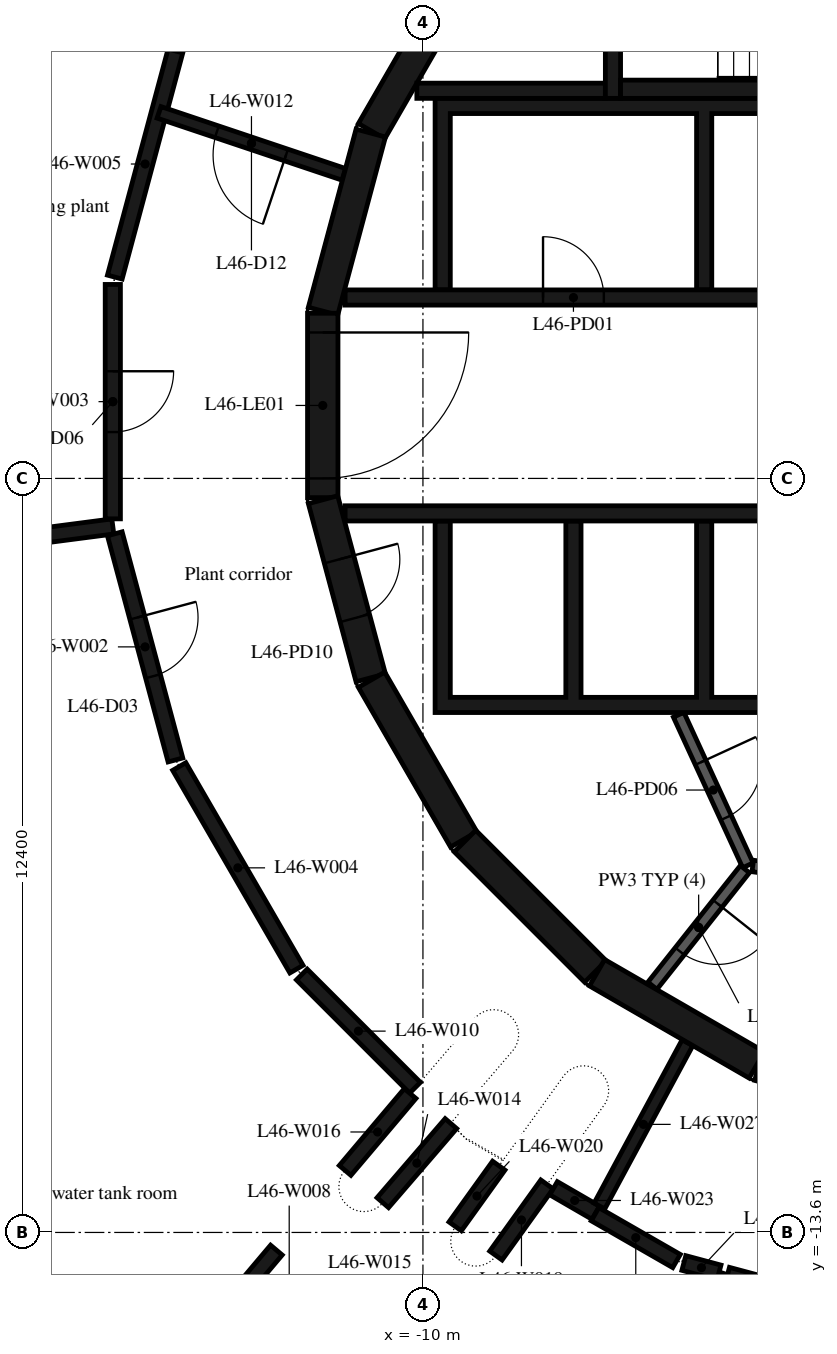
"""IFC4 building model, lengths in metres.
Left out: names, types, materials, properties, quantities, classifications, styles, units other than length and angle.
Written with IfcOpenShell. Run it as: python <this file> out.ifc"""

import sys

from ifc_helpers import new_model, si_unit, direction, frame, frame_2d, origin, place, context, subcontext, project, spatial, polyline, rectangle, outline, extrude, element, fill, save


model = new_model("IFC4")
c1 = context("Model", 3, precision=1e-05, world=origin(), true_north=direction((0.0, 1.0)))
c2 = subcontext(c1, "Body", "Model", "MODEL_VIEW")
j1 = project(units=[si_unit("LENGTHUNIT", "METRE"), si_unit("PLANEANGLEUNIT", "RADIAN")], contexts=[c1])
p1 = place(None, origin())
s1 = spatial("IfcSite", under=j1, at=p1, CompositionType="ELEMENT")
p2 = place(p1, origin())
s2 = spatial("IfcBuilding", under=s1, at=p2, CompositionType="ELEMENT")
p3 = place(p2, frame((0.0, 0.0, 183.2)))
s3 = spatial("IfcBuildingStorey", under=s2, at=p3, CompositionType="ELEMENT", Elevation=183.2)
for number, where, z_axis, x_axis in (
    (1, (-9.329, 7.137, 0.0), (0.0, 0.0, 1.0), (-0.5, -0.866, 0.0)),
    (2, (-10.858, 4.479, 0.0), (0.0, 0.0, 1.0), (-0.259, -0.966, 0.0)),
):
    element("IfcWall", number, at=place(p3, frame(where, z_axis=z_axis, x_axis=x_axis)), inside=s3, PredefinedType="SHEAR", context=c2, shape_type="SweptSolid", body=[
        extrude(rectangle(XDim=3.033, YDim=0.5, at=frame_2d((1.516, 0.0))), origin(), (0.0, 0.0, 1.0), 4.75),
    ])
p4 = place(p3, frame((-11.647, 1.516, 0.0), z_axis=(0.0, 0.0, 1.0), x_axis=(0.0, -1.0, 0.0)))
e3 = element("IfcWall", 3, at=p4, inside=s3, PredefinedType="SHEAR", context=c2, shape_type="SweptSolid", body=[
    extrude(rectangle(XDim=3.033, YDim=0.5, at=frame_2d((1.516, 0.0))), origin(), (0.0, 0.0, 1.0), 4.75),
])
p5 = place(p4, frame((0.316, 0.0, 0.0)))
e4 = element("IfcOpeningElement", 4, at=p5, cuts=e3, PredefinedType="OPENING", context=c2, shape_type="SweptSolid", body=[
    extrude(rectangle(XDim=2.4, YDim=2.1, at=frame_2d((1.2, 1.05))), frame((0.0, 0.26, 0.0), z_axis=(0.0, -1.0, 0.0), x_axis=(1.0, 0.0, 0.0)), (0.0, 0.0, 1.0), 0.52),
])
p6 = place(p3, frame((-11.643, -1.55, 0.0), z_axis=(0.0, 0.0, 1.0), x_axis=(0.258734743916, -0.965948410781, 0.0)))
e5 = element("IfcWall", 5, at=p6, inside=s3, PredefinedType="SHEAR", context=c2, shape_type="SweptSolid", body=[
    extrude(rectangle(XDim=3.033, YDim=0.5, at=frame_2d((1.516, 0.0))), origin(), (0.0, 0.0, 1.0), 4.75),
])
p7 = place(p6, frame((1.016, 0.0, 0.0)))
e6 = element("IfcOpeningElement", 6, at=p7, cuts=e5, PredefinedType="OPENING", context=c2, shape_type="SweptSolid", body=[
    extrude(rectangle(XDim=1.0, YDim=2.4, at=frame_2d((0.5, 1.2))), frame((0.0, 0.26, 0.0), z_axis=(0.0, -1.0, 0.0), x_axis=(1.0, 0.0, 0.0)), (0.0, 0.0, 1.0), 0.52),
])
p8 = place(p3, frame((-10.845, -4.51, 0.0), z_axis=(0.0, 0.0, 1.0), x_axis=(0.500087131594, -0.865975092491, 0.0)))
e7 = element("IfcWall", 7, at=p8, inside=s3, PredefinedType="SHEAR", context=c2, shape_type="SweptSolid", body=[
    extrude(rectangle(XDim=3.033, YDim=0.5, at=frame_2d((1.516, 0.0))), origin(), (0.0, 0.0, 1.0), 4.75),
])
p9 = place(p3, frame((-9.308, -7.164, 0.0), z_axis=(0.0, 0.0, 1.0), x_axis=(0.707106781187, -0.707106781187, 0.0)))
e8 = element("IfcWall", 8, at=p9, inside=s3, PredefinedType="SHEAR", context=c2, shape_type="SweptSolid", body=[
    extrude(rectangle(XDim=3.032, YDim=0.5, at=frame_2d((1.516, 0.0))), origin(), (0.0, 0.0, 1.0), 4.75),
])
for number, where, z_axis, x_axis in (
    (9, (-7.137, -9.329, 0.0), (0.0, 0.0, 1.0), (0.866, -0.5, 0.0)),
    (10, (-4.479, -10.858, 0.0), (0.0, 0.0, 1.0), (0.966, -0.259, 0.0)),
):
    element("IfcWall", number, at=place(p3, frame(where, z_axis=z_axis, x_axis=x_axis)), inside=s3, PredefinedType="SHEAR", context=c2, shape_type="SweptSolid", body=[
        extrude(rectangle(XDim=3.033, YDim=0.5, at=frame_2d((1.516, 0.0))), origin(), (0.0, 0.0, 1.0), 4.75),
    ])
p10 = place(p3, frame((-6.75, 5.2, 0.0), z_axis=(0.0, 0.0, 1.0), x_axis=(1.0, 0.0, 0.0)))
e11 = element("IfcWall", 11, at=p10, inside=s3, PredefinedType="SHEAR", context=c2, shape_type="SweptSolid", body=[
    extrude(rectangle(XDim=6.75, YDim=0.3, at=frame_2d((3.375, 0.0))), origin(), (0.0, 0.0, 1.0), 4.75),
])
p11 = place(p3, frame((-6.875, 8.97, 0.0), z_axis=(0.0, 0.0, 1.0), x_axis=(0.0, -1.0, 0.0)))
e12 = element("IfcWall", 12, at=p11, inside=s3, PredefinedType="SHEAR", context=c2, shape_type="SweptSolid", body=[
    extrude(rectangle(XDim=3.92, YDim=0.25, at=frame_2d((1.96, 0.0))), origin(), (0.0, 0.0, 1.0), 4.75),
])
p12 = place(p11, frame((1.61, 0.0, 0.0)))
e13 = element("IfcOpeningElement", 13, at=p12, cuts=e12, PredefinedType="OPENING", context=c2, shape_type="SweptSolid", body=[
    extrude(rectangle(XDim=1.2, YDim=2.1, at=frame_2d((0.6, 1.05))), frame((0.0, 0.135, 0.0), z_axis=(0.0, -1.0, 0.0), x_axis=(1.0, 0.0, 0.0)), (0.0, 0.0, 1.0), 0.27),
])
p13 = place(p3, frame((-7.0, 5.175, 0.0), z_axis=(0.0, 0.0, 1.0), x_axis=(-1.0, 0.0, 0.0)))
e14 = element("IfcWall", 14, at=p13, inside=s3, PredefinedType="SHEAR", context=c2, shape_type="SweptSolid", body=[
    extrude(rectangle(XDim=3.1, YDim=0.25, at=frame_2d((1.55, 0.0))), origin(), (0.0, 0.0, 1.0), 4.75),
])
p14 = place(p3, origin())
e15 = element("IfcWall", 15, at=p14, inside=s3, PredefinedType="SHEAR", context=c2, shape_type="SweptSolid", body=[
    extrude(outline(polyline([(-9.55, 4.8), (-5.5, 4.8), (-5.5, 1.9), (-5.25, 1.9), (-5.25, 4.8), (-1.2, 4.8), (-1.2, 1.9), (-0.95, 1.9), (-0.95, 4.8), (0.95, 4.8), (0.95, 1.9), (1.2, 1.9), (1.2, 4.8), (3.1, 4.8), (3.1, 1.9), (3.35, 1.9), (3.35, 4.8), (5.25, 4.8), (5.25, 1.9), (5.5, 1.9), (5.5, 4.8), (7.4, 4.8), (7.4, 1.9), (7.65, 1.9), (7.65, 4.8), (9.55, 4.8), (9.55, 1.9), (9.8, 1.9), (9.8, 4.8), (9.8, 5.05), (-9.8, 5.05), (-9.8, 4.8), (-9.8, 1.9), (-9.55, 1.9), (-9.55, 4.8)])), origin(), (0.0, 0.0, 1.0), 4.75),
])
p15 = place(p3, origin())
e16 = element("IfcWall", 16, at=p15, inside=s3, PredefinedType="SHEAR", context=c2, shape_type="SweptSolid", body=[
    extrude(outline(polyline([(9.8, -5.05), (9.8, -4.8), (9.8, -1.9), (9.55, -1.9), (9.55, -4.8), (7.65, -4.8), (7.65, -1.9), (7.4, -1.9), (7.4, -4.8), (5.5, -4.8), (5.5, -1.9), (5.25, -1.9), (5.25, -4.8), (3.35, -4.8), (3.35, -1.9), (3.1, -1.9), (3.1, -4.8), (1.2, -4.8), (1.2, -1.9), (0.95, -1.9), (0.95, -4.8), (-0.95, -4.8), (-0.95, -1.9), (-1.2, -1.9), (-1.2, -4.8), (-5.25, -4.8), (-5.25, -1.9), (-5.5, -1.9), (-5.5, -4.8), (-7.4, -4.8), (-7.4, -1.9), (-7.65, -1.9), (-7.65, -4.8), (-9.55, -4.8), (-9.55, -1.9), (-9.8, -1.9), (-9.8, -4.8), (-9.8, -5.05), (9.8, -5.05)])), origin(), (0.0, 0.0, 1.0), 4.75),
])
p16 = place(p3, frame((-11.28, 1.775, 0.0), z_axis=(0.0, 0.0, 1.0), x_axis=(1.0, 0.0, 0.0)))
e17 = element("IfcWall", 17, at=p16, inside=s3, PredefinedType="SHEAR", context=c2, shape_type="SweptSolid", body=[
    extrude(rectangle(XDim=14.38, YDim=0.25, at=frame_2d((7.19, 0.0))), origin(), (0.0, 0.0, 1.0), 4.75),
])
p17 = place(p16, frame((10.73, 0.0, 0.0)))
e18 = element("IfcOpeningElement", 18, at=p17, cuts=e17, PredefinedType="OPENING", context=c2, shape_type="SweptSolid", body=[
    extrude(rectangle(XDim=1.1, YDim=2.1, at=frame_2d((0.55, 1.05))), frame((0.0, 0.135, 0.0), z_axis=(0.0, -1.0, 0.0), x_axis=(1.0, 0.0, 0.0)), (0.0, 0.0, 1.0), 0.27),
])
p18 = place(p16, frame((12.88, 0.0, 0.0)))
e19 = element("IfcOpeningElement", 19, at=p18, cuts=e17, PredefinedType="OPENING", context=c2, shape_type="SweptSolid", body=[
    extrude(rectangle(XDim=1.1, YDim=2.1, at=frame_2d((0.55, 1.05))), frame((0.0, 0.135, 0.0), z_axis=(0.0, -1.0, 0.0), x_axis=(1.0, 0.0, 0.0)), (0.0, 0.0, 1.0), 0.27),
])
p19 = place(p16, frame((3.255, 0.0, 0.0)))
e20 = element("IfcOpeningElement", 20, at=p19, cuts=e17, PredefinedType="OPENING", context=c2, shape_type="SweptSolid", body=[
    extrude(rectangle(XDim=1.0, YDim=2.4, at=frame_2d((0.5, 1.2))), frame((0.0, 0.135, 0.0), z_axis=(0.0, -1.0, 0.0), x_axis=(1.0, 0.0, 0.0)), (0.0, 0.0, 1.0), 0.27),
])
p20 = place(p16, frame((7.555, 0.0, 0.0)))
e21 = element("IfcOpeningElement", 21, at=p20, cuts=e17, PredefinedType="OPENING", context=c2, shape_type="SweptSolid", body=[
    extrude(rectangle(XDim=1.0, YDim=2.4, at=frame_2d((0.5, 1.2))), frame((0.0, 0.135, 0.0), z_axis=(0.0, -1.0, 0.0), x_axis=(1.0, 0.0, 0.0)), (0.0, 0.0, 1.0), 0.27),
])
p21 = place(p3, frame((-11.28, -1.775, 0.0), z_axis=(0.0, 0.0, 1.0), x_axis=(1.0, 0.0, 0.0)))
e22 = element("IfcWall", 22, at=p21, inside=s3, PredefinedType="SHEAR", context=c2, shape_type="SweptSolid", body=[
    extrude(rectangle(XDim=14.38, YDim=0.25, at=frame_2d((7.19, 0.0))), origin(), (0.0, 0.0, 1.0), 4.75),
])
p22 = place(p21, frame((12.88, 0.0, 0.0)))
e23 = element("IfcOpeningElement", 23, at=p22, cuts=e22, PredefinedType="OPENING", context=c2, shape_type="SweptSolid", body=[
    extrude(rectangle(XDim=1.1, YDim=2.1, at=frame_2d((0.55, 1.05))), frame((0.0, 0.135, 0.0), z_axis=(0.0, -1.0, 0.0), x_axis=(1.0, 0.0, 0.0)), (0.0, 0.0, 1.0), 0.27),
])
p23 = place(p21, frame((7.555, 0.0, 0.0)))
e24 = element("IfcOpeningElement", 24, at=p23, cuts=e22, PredefinedType="OPENING", context=c2, shape_type="SweptSolid", body=[
    extrude(rectangle(XDim=1.0, YDim=2.4, at=frame_2d((0.5, 1.2))), frame((0.0, 0.135, 0.0), z_axis=(0.0, -1.0, 0.0), x_axis=(1.0, 0.0, 0.0)), (0.0, 0.0, 1.0), 0.27),
])
p24 = place(p21, frame((10.78, 0.0, 0.0)))
e25 = element("IfcOpeningElement", 25, at=p24, cuts=e22, PredefinedType="OPENING", context=c2, shape_type="SweptSolid", body=[
    extrude(rectangle(XDim=1.0, YDim=2.4, at=frame_2d((0.5, 1.2))), frame((0.0, 0.135, 0.0), z_axis=(0.0, -1.0, 0.0), x_axis=(1.0, 0.0, 0.0)), (0.0, 0.0, 1.0), 0.27),
])
p25 = place(p3, frame((-5.795, -5.086, 0.0), z_axis=(0.0, 0.0, 1.0), x_axis=(0.417887867606, -0.908498613157, 0.0)))
e26 = element("IfcWall", 26, at=p25, inside=s3, PredefinedType="PARTITIONING", context=c2, shape_type="SweptSolid", body=[
    extrude(rectangle(XDim=2.726, YDim=0.19, at=frame_2d((1.363, 0.0))), origin(), (0.0, 0.0, 1.0), 4.75),
])
p26 = place(p25, frame((0.863, 0.0, 0.0)))
e27 = element("IfcOpeningElement", 27, at=p26, cuts=e26, PredefinedType="OPENING", context=c2, shape_type="SweptSolid", body=[
    extrude(rectangle(XDim=1.0, YDim=2.4, at=frame_2d((0.5, 1.2))), frame((0.0, 0.105, 0.0), z_axis=(0.0, -1.0, 0.0), x_axis=(1.0, 0.0, 0.0)), (0.0, 0.0, 1.0), 0.21),
])
p27 = place(p3, frame((-4.706, -7.625, 0.0), z_axis=(0.0, 0.0, 1.0), x_axis=(-0.621392599334, -0.783499353856, 0.0)))
e28 = element("IfcWall", 28, at=p27, inside=s3, PredefinedType="PARTITIONING", context=c2, shape_type="SweptSolid", body=[
    extrude(rectangle(XDim=2.447, YDim=0.19, at=frame_2d((1.224, 0.0))), origin(), (0.0, 0.0, 1.0), 4.75),
])
p28 = place(p27, frame((0.724, 0.0, 0.0)))
e29 = element("IfcOpeningElement", 29, at=p28, cuts=e28, PredefinedType="OPENING", context=c2, shape_type="SweptSolid", body=[
    extrude(rectangle(XDim=1.0, YDim=2.4, at=frame_2d((0.5, 1.2))), frame((0.0, 0.105, 0.0), z_axis=(0.0, -1.0, 0.0), x_axis=(1.0, 0.0, 0.0)), (0.0, 0.0, 1.0), 0.21),
])
p29 = place(p3, frame((-2.42, -7.865, 0.0), z_axis=(0.0, 0.0, 1.0), x_axis=(-0.990972299108, 0.134066783362, 0.0)))
e30 = element("IfcWall", 30, at=p29, inside=s3, PredefinedType="PARTITIONING", context=c2, shape_type="SweptSolid", body=[
    extrude(rectangle(XDim=2.176, YDim=0.19, at=frame_2d((1.088, 0.0))), origin(), (0.0, 0.0, 1.0), 4.75),
])
p30 = place(p3, frame((-15.1, -1.99, 0.0), z_axis=(0.0, 0.0, 1.0), x_axis=(-0.991616704788, -0.129214205046, 0.0)))
e31 = element("IfcWall", 31, at=p30, inside=s3, PredefinedType="PARTITIONING", context=c2, shape_type="SweptSolid", body=[
    extrude(rectangle(XDim=4.176, YDim=0.25, at=frame_2d((2.088, 0.0))), origin(), (0.0, 0.0, 1.0), 4.75),
])
p31 = place(p3, frame((-15.068, -2.111, 0.0), z_axis=(0.0, 0.0, 1.0), x_axis=(0.259059323171, -0.965861411942, 0.0)))
e32 = element("IfcWall", 32, at=p31, inside=s3, PredefinedType="PARTITIONING", context=c2, shape_type="SweptSolid", body=[
    extrude(rectangle(XDim=3.851, YDim=0.25, at=frame_2d((1.925, 0.0))), origin(), (0.0, 0.0, 1.0), 4.75),
])
p32 = place(p31, frame((1.425, 0.0, 0.0)))
e33 = element("IfcOpeningElement", 33, at=p32, cuts=e32, PredefinedType="OPENING", context=c2, shape_type="SweptSolid", body=[
    extrude(rectangle(XDim=1.0, YDim=2.1, at=frame_2d((0.5, 1.05))), frame((0.0, 0.135, 0.0), z_axis=(0.0, -1.0, 0.0), x_axis=(1.0, 0.0, 0.0)), (0.0, 0.0, 1.0), 0.27),
])
p33 = place(p3, frame((-15.1, 1.99, 0.0), z_axis=(0.0, 0.0, 1.0), x_axis=(0.0, -1.0, 0.0)))
e34 = element("IfcWall", 34, at=p33, inside=s3, PredefinedType="PARTITIONING", context=c2, shape_type="SweptSolid", body=[
    extrude(rectangle(XDim=3.855, YDim=0.25, at=frame_2d((1.927, 0.0))), origin(), (0.0, 0.0, 1.0), 4.75),
])
p34 = place(p33, frame((1.427, 0.0, 0.0)))
e35 = element("IfcOpeningElement", 35, at=p34, cuts=e34, PredefinedType="OPENING", context=c2, shape_type="SweptSolid", body=[
    extrude(rectangle(XDim=1.0, YDim=2.1, at=frame_2d((0.5, 1.05))), frame((0.0, 0.135, 0.0), z_axis=(0.0, -1.0, 0.0), x_axis=(1.0, 0.0, 0.0)), (0.0, 0.0, 1.0), 0.27),
])
p35 = place(p3, frame((-14.007, -5.938, 0.0), z_axis=(0.0, 0.0, 1.0), x_axis=(0.500708693508, -0.865615852585, 0.0)))
e36 = element("IfcWall", 36, at=p35, inside=s3, PredefinedType="PARTITIONING", context=c2, shape_type="SweptSolid", body=[
    extrude(rectangle(XDim=3.849, YDim=0.25, at=frame_2d((1.925, 0.0))), origin(), (0.0, 0.0, 1.0), 4.75),
])
p36 = place(p3, frame((-14.07, 5.83, 0.0), z_axis=(0.0, 0.0, 1.0), x_axis=(-0.259059323171, -0.965861411942, 0.0)))
e37 = element("IfcWall", 37, at=p36, inside=s3, PredefinedType="PARTITIONING", context=c2, shape_type="SweptSolid", body=[
    extrude(rectangle(XDim=3.851, YDim=0.25, at=frame_2d((1.925, 0.0))), origin(), (0.0, 0.0, 1.0), 4.75),
])
p37 = place(p3, frame((-12.41, -13.89, 0.0), z_axis=(0.0, 0.0, 1.0), x_axis=(-0.645015932436, -0.764169121925, 0.0)))
e38 = element("IfcWall", 38, at=p37, inside=s3, PredefinedType="PARTITIONING", context=c2, shape_type="SweptSolid", body=[
    extrude(rectangle(XDim=1.537, YDim=0.25, at=frame_2d((0.768, 0.0))), origin(), (0.0, 0.0, 1.0), 4.75),
])
p38 = place(p3, frame((-11.992, -9.358, 0.0), z_axis=(0.0, 0.0, 1.0), x_axis=(0.707153144284, -0.707060415049, 0.0)))
e39 = element("IfcWall", 39, at=p38, inside=s3, PredefinedType="PARTITIONING", context=c2, shape_type="SweptSolid", body=[
    extrude(rectangle(XDim=2.633, YDim=0.25, at=frame_2d((1.316, 0.0))), origin(), (0.0, 0.0, 1.0), 4.75),
])
p39 = place(p3, frame((-11.3, 3.8, 0.0), z_axis=(0.0, 0.0, 1.0), x_axis=(-0.94805712629, 0.318100118345, 0.0)))
e40 = element("IfcWall", 40, at=p39, inside=s3, PredefinedType="PARTITIONING", context=c2, shape_type="SweptSolid", body=[
    extrude(rectangle(XDim=3.207, YDim=0.2, at=frame_2d((1.603, 0.0))), origin(), (0.0, 0.0, 1.0), 4.75),
])
p40 = place(p39, frame((1.003, 0.0, 0.0)))
e41 = element("IfcOpeningElement", 41, at=p40, cuts=e40, PredefinedType="OPENING", context=c2, shape_type="SweptSolid", body=[
    extrude(rectangle(XDim=1.2, YDim=2.1, at=frame_2d((0.6, 1.05))), frame((0.0, 0.11, 0.0), z_axis=(0.0, -1.0, 0.0), x_axis=(1.0, 0.0, 0.0)), (0.0, 0.0, 1.0), 0.22),
])
p41 = place(p3, frame((-10.66, -13.11, 0.0), z_axis=(0.0, 0.0, 1.0), x_axis=(0.652652485568, 0.757657398223, 0.0)))
e42 = element("IfcWall", 42, at=p41, inside=s3, PredefinedType="PARTITIONING", context=c2, shape_type="SweptSolid", body=[
    extrude(rectangle(XDim=1.716, YDim=0.25, at=frame_2d((0.858, 0.0))), origin(), (0.0, 0.0, 1.0), 4.75),
])
p42 = place(p3, frame((-10.211, -11.315, 0.0), z_axis=(0.0, 0.0, 1.0), x_axis=(-0.645677872328, -0.763609903803, 0.0)))
e43 = element("IfcWall", 43, at=p42, inside=s3, PredefinedType="PARTITIONING", context=c2, shape_type="SweptSolid", body=[
    extrude(rectangle(XDim=1.656, YDim=0.25, at=frame_2d((0.828, 0.0))), origin(), (0.0, 0.0, 1.0), 4.75),
])
p43 = place(p3, frame((-8.8, -13.98, 0.0), z_axis=(0.0, 0.0, 1.0), x_axis=(0.583272745403, 0.812276371976, 0.0)))
e44 = element("IfcWall", 44, at=p43, inside=s3, PredefinedType="PARTITIONING", context=c2, shape_type="SweptSolid", body=[
    extrude(rectangle(XDim=1.44, YDim=0.25, at=frame_2d((0.72, 0.0))), origin(), (0.0, 0.0, 1.0), 4.75),
])
p44 = place(p3, frame((-8.753, -12.501, 0.0), z_axis=(0.0, 0.0, 1.0), x_axis=(-0.583284065891, -0.812268242933, 0.0)))
e45 = element("IfcWall", 45, at=p44, inside=s3, PredefinedType="PARTITIONING", context=c2, shape_type="SweptSolid", body=[
    extrude(rectangle(XDim=1.229, YDim=0.25, at=frame_2d((0.615, 0.0))), origin(), (0.0, 0.0, 1.0), 4.75),
])
p45 = place(p3, frame((-7.852, -12.873, 0.0), z_axis=(0.0, 0.0, 1.0), x_axis=(0.865197326025, -0.501431537739, 0.0)))
e46 = element("IfcWall", 46, at=p45, inside=s3, PredefinedType="PARTITIONING", context=c2, shape_type="SweptSolid", body=[
    extrude(rectangle(XDim=0.803, YDim=0.25, at=frame_2d((0.402, 0.0))), origin(), (0.0, 0.0, 1.0), 4.75),
])
p46 = place(p3, frame((-7.844, -22.375, 0.0), z_axis=(0.0, 0.0, 1.0), x_axis=(0.330759154165, 0.943715201709, 0.0)))
e47 = element("IfcWall", 47, at=p46, inside=s3, PredefinedType="PARTITIONING", context=c2, shape_type="SweptSolid", body=[
    extrude(rectangle(XDim=8.567, YDim=0.25, at=frame_2d((4.283, 0.0))), origin(), (0.0, 0.0, 1.0), 4.75),
])
p47 = place(p3, frame((-7.097, -13.165, 0.0), z_axis=(0.0, 0.0, 1.0), x_axis=(0.474500660471, 0.880255146655, 0.0)))
e48 = element("IfcWall", 48, at=p47, inside=s3, PredefinedType="PARTITIONING", context=c2, shape_type="SweptSolid", body=[
    extrude(rectangle(XDim=3.051, YDim=0.2, at=frame_2d((1.525, 0.0))), origin(), (0.0, 0.0, 1.0), 4.75),
])
p48 = place(p3, frame((-5.83, -14.07, 0.0), z_axis=(0.0, 0.0, 1.0), x_axis=(-0.867015512993, 0.498281145769, 0.0)))
e49 = element("IfcWall", 49, at=p48, inside=s3, PredefinedType="PARTITIONING", context=c2, shape_type="SweptSolid", body=[
    extrude(rectangle(XDim=1.545, YDim=0.25, at=frame_2d((0.773, 0.0))), origin(), (0.0, 0.0, 1.0), 4.75),
])
p49 = place(p3, frame((-5.131, -14.258, 0.0), z_axis=(0.0, 0.0, 1.0), x_axis=(-0.965827909732, 0.259184198561, 0.0)))
e50 = element("IfcWall", 50, at=p49, inside=s3, PredefinedType="PARTITIONING", context=c2, shape_type="SweptSolid", body=[
    extrude(rectangle(XDim=0.599, YDim=0.25, at=frame_2d((0.3, 0.0))), origin(), (0.0, 0.0, 1.0), 4.75),
])
p50 = place(p3, frame((-4.992, -14.295, 0.0), z_axis=(0.0, 0.0, 1.0), x_axis=(0.965855783514, -0.259080306956, 0.0)))
e51 = element("IfcWall", 51, at=p50, inside=s3, PredefinedType="PARTITIONING", context=c2, shape_type="SweptSolid", body=[
    extrude(rectangle(XDim=3.108, YDim=0.25, at=frame_2d((1.554, 0.0))), origin(), (0.0, 0.0, 1.0), 4.75),
])
p51 = place(p5, origin())
e52 = element("IfcDoor", 52, at=p51, inside=s3, OperationType="DOUBLE_DOOR_SINGLE_SWING", PredefinedType="DOOR", context=c2, shape_type="SweptSolid", body=[
    extrude(rectangle(XDim=2.4, YDim=2.1, at=frame_2d((1.2, 1.05))), frame((0.0, 0.025, 0.0), z_axis=(0.0, -1.0, 0.0), x_axis=(1.0, 0.0, 0.0)), (0.0, 0.0, 1.0), 0.05),
])
fill(e4, e52)
p52 = place(p19, origin())
e53 = element("IfcDoor", 53, at=p52, inside=s3, OperationType="SINGLE_SWING_LEFT", PredefinedType="DOOR", context=c2, shape_type="SweptSolid", body=[
    extrude(rectangle(XDim=1.0, YDim=2.4, at=frame_2d((0.5, 1.2))), frame((0.0, 0.025, 0.0), z_axis=(0.0, -1.0, 0.0), x_axis=(1.0, 0.0, 0.0)), (0.0, 0.0, 1.0), 0.05),
])
fill(e20, e53)
p53 = place(p26, origin())
e54 = element("IfcDoor", 54, at=p53, inside=s3, OperationType="SINGLE_SWING_RIGHT", PredefinedType="DOOR", context=c2, shape_type="SweptSolid", body=[
    extrude(rectangle(XDim=1.0, YDim=2.4, at=frame_2d((0.5, 1.2))), frame((0.0, 0.025, 0.0), z_axis=(0.0, -1.0, 0.0), x_axis=(1.0, 0.0, 0.0)), (0.0, 0.0, 1.0), 0.05),
])
fill(e27, e54)
p54 = place(p28, origin())
e55 = element("IfcDoor", 55, at=p54, inside=s3, OperationType="SINGLE_SWING_LEFT", PredefinedType="DOOR", context=c2, shape_type="SweptSolid", body=[
    extrude(rectangle(XDim=1.0, YDim=2.4, at=frame_2d((0.5, 1.2))), frame((0.0, 0.025, 0.0), z_axis=(0.0, -1.0, 0.0), x_axis=(1.0, 0.0, 0.0)), (0.0, 0.0, 1.0), 0.05),
])
fill(e29, e55)
p55 = place(p7, origin())
e56 = element("IfcDoor", 56, at=p55, inside=s3, OperationType="SINGLE_SWING_RIGHT", PredefinedType="DOOR", context=c2, shape_type="SweptSolid", body=[
    extrude(rectangle(XDim=1.0, YDim=2.4, at=frame_2d((0.5, 1.2))), frame((0.0, 0.025, 0.0), z_axis=(0.0, -1.0, 0.0), x_axis=(1.0, 0.0, 0.0)), (0.0, 0.0, 1.0), 0.05),
])
fill(e6, e56)
p56 = place(p32, origin())
e57 = element("IfcDoor", 57, at=p56, inside=s3, OperationType="SINGLE_SWING_LEFT", PredefinedType="DOOR", context=c2, shape_type="SweptSolid", body=[
    extrude(rectangle(XDim=1.0, YDim=2.1, at=frame_2d((0.5, 1.05))), frame((0.0, 0.025, 0.0), z_axis=(0.0, -1.0, 0.0), x_axis=(1.0, 0.0, 0.0)), (0.0, 0.0, 1.0), 0.05),
])
fill(e33, e57)
p57 = place(p34, origin())
e58 = element("IfcDoor", 58, at=p57, inside=s3, OperationType="SINGLE_SWING_LEFT", PredefinedType="DOOR", context=c2, shape_type="SweptSolid", body=[
    extrude(rectangle(XDim=1.0, YDim=2.1, at=frame_2d((0.5, 1.05))), frame((0.0, 0.025, 0.0), z_axis=(0.0, -1.0, 0.0), x_axis=(1.0, 0.0, 0.0)), (0.0, 0.0, 1.0), 0.05),
])
fill(e35, e58)
p58 = place(p40, origin())
e59 = element("IfcDoor", 59, at=p58, inside=s3, OperationType="SINGLE_SWING_LEFT", PredefinedType="DOOR", context=c2, shape_type="SweptSolid", body=[
    extrude(rectangle(XDim=1.2, YDim=2.1, at=frame_2d((0.6, 1.05))), frame((0.0, 0.025, 0.0), z_axis=(0.0, -1.0, 0.0), x_axis=(1.0, 0.0, 0.0)), (0.0, 0.0, 1.0), 0.05),
])
fill(e41, e59)
save(model, sys.argv[1])
